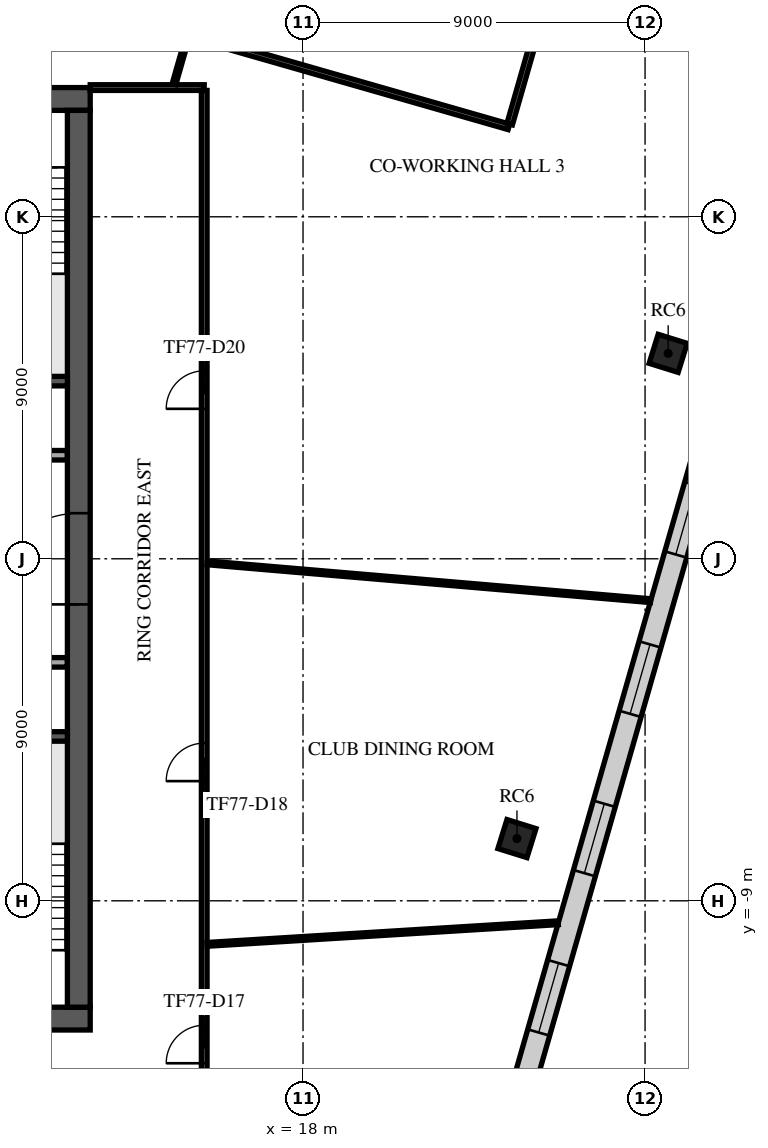
"""IFC4 building model, lengths in metres.
Left out: names, types, materials, properties, quantities, classifications, styles, units other than length and angle.
Written with IfcOpenShell. Run it as: python <this file> out.ifc"""

import sys

from ifc_helpers import new_model, si_unit, direction, frame, frame_2d, origin, origin_2d, place, context, subcontext, project, spatial, rectangle, extrude, element, fill, save


model = new_model("IFC4")
c1 = context("Model", 3, precision=1e-05, world=origin(), true_north=direction((0.0, 1.0)))
c2 = subcontext(c1, "Body", "Model", "MODEL_VIEW")
j1 = project(units=[si_unit("LENGTHUNIT", "METRE"), si_unit("PLANEANGLEUNIT", "RADIAN")], contexts=[c1])
p1 = place(None, origin())
s1 = spatial("IfcSite", under=j1, at=p1, CompositionType="ELEMENT")
p2 = place(p1, origin())
s2 = spatial("IfcBuilding", under=s1, at=p2, CompositionType="ELEMENT")
p3 = place(p2, frame((0.0, 0.0, 324.5)))
s3 = spatial("IfcBuildingStorey", under=s2, at=p3, CompositionType="ELEMENT", Elevation=324.5)
for number, where, z_axis, x_axis in (
    (1, (23.629, -7.363, 0.0), (0.0, 0.0, 1.0), (0.298, 0.955, 0.0)),
    (2, (27.608, 5.406, 0.0), (0.0, 0.0, 1.0), (0.298, 0.955, 0.0)),
):
    element("IfcColumn", number, at=place(p3, frame(where, z_axis=z_axis, x_axis=x_axis)), inside=s3, PredefinedType="COLUMN", context=c2, shape_type="SweptSolid", body=[
        extrude(rectangle(XDim=0.8, YDim=0.8, at=origin_2d()), origin(), (0.0, 0.0, 1.0), 4.0),
    ])
p4 = place(p3, frame((-12.4, 12.1, 0.0), z_axis=(0.0, 0.0, 1.0), x_axis=(1.0, 0.0, 0.0)))
e3 = element("IfcWall", 3, at=p4, inside=s3, PredefinedType="SHEAR", context=c2, shape_type="SweptSolid", body=[
    extrude(rectangle(XDim=24.8, YDim=0.6, at=frame_2d((12.4, 0.0))), origin(), (0.0, 0.0, 1.0), 3.65),
])
p5 = place(p4, frame((11.2, 0.0, 0.0)))
e4 = element("IfcOpeningElement", 4, at=p5, cuts=e3, PredefinedType="OPENING", context=c2, shape_type="SweptSolid", body=[
    extrude(rectangle(XDim=2.4, YDim=2.4, at=frame_2d((1.2, 1.2))), frame((0.0, 0.31, 0.0), z_axis=(0.0, -1.0, 0.0), x_axis=(1.0, 0.0, 0.0)), (0.0, 0.0, 1.0), 0.62),
])
p6 = place(p4, frame((22.025, 0.0, 0.0)))
e5 = element("IfcOpeningElement", 5, at=p6, cuts=e3, PredefinedType="OPENING", context=c2, shape_type="SweptSolid", body=[
    extrude(rectangle(XDim=1.2, YDim=2.1, at=frame_2d((0.6, 1.05))), frame((0.0, 0.31, 0.0), z_axis=(0.0, -1.0, 0.0), x_axis=(1.0, 0.0, 0.0)), (0.0, 0.0, 1.0), 0.62),
])
p7 = place(p4, frame((1.0, 0.0, 0.0)))
e6 = element("IfcOpeningElement", 6, at=p7, cuts=e3, PredefinedType="OPENING", context=c2, shape_type="SweptSolid", body=[
    extrude(rectangle(XDim=1.0, YDim=2.1, at=frame_2d((0.5, 1.05))), frame((0.0, 0.31, 0.0), z_axis=(0.0, -1.0, 0.0), x_axis=(1.0, 0.0, 0.0)), (0.0, 0.0, 1.0), 0.62),
])
p8 = place(p3, frame((-12.4, -12.1, 0.0), z_axis=(0.0, 0.0, 1.0), x_axis=(1.0, 0.0, 0.0)))
e7 = element("IfcWall", 7, at=p8, inside=s3, PredefinedType="SHEAR", context=c2, shape_type="SweptSolid", body=[
    extrude(rectangle(XDim=24.8, YDim=0.6, at=frame_2d((12.4, 0.0))), origin(), (0.0, 0.0, 1.0), 3.65),
])
p9 = place(p8, frame((7.3, 0.0, 0.0)))
e8 = element("IfcOpeningElement", 8, at=p9, cuts=e7, PredefinedType="OPENING", context=c2, shape_type="SweptSolid", body=[
    extrude(rectangle(XDim=2.0, YDim=2.1, at=frame_2d((1.0, 1.05))), frame((0.0, 0.31, 0.0), z_axis=(0.0, -1.0, 0.0), x_axis=(1.0, 0.0, 0.0)), (0.0, 0.0, 1.0), 0.62),
])
p10 = place(p8, frame((17.425, 0.0, 0.0)))
e9 = element("IfcOpeningElement", 9, at=p10, cuts=e7, PredefinedType="OPENING", context=c2, shape_type="SweptSolid", body=[
    extrude(rectangle(XDim=1.2, YDim=2.1, at=frame_2d((0.6, 1.05))), frame((0.0, 0.31, 0.0), z_axis=(0.0, -1.0, 0.0), x_axis=(1.0, 0.0, 0.0)), (0.0, 0.0, 1.0), 0.62),
])
p11 = place(p8, frame((1.575, 0.0, 0.0)))
e10 = element("IfcOpeningElement", 10, at=p11, cuts=e7, PredefinedType="OPENING", context=c2, shape_type="SweptSolid", body=[
    extrude(rectangle(XDim=1.2, YDim=2.1, at=frame_2d((0.6, 1.05))), frame((0.0, 0.31, 0.0), z_axis=(0.0, -1.0, 0.0), x_axis=(1.0, 0.0, 0.0)), (0.0, 0.0, 1.0), 0.62),
])
p12 = place(p8, frame((22.025, 0.0, 0.0)))
e11 = element("IfcOpeningElement", 11, at=p12, cuts=e7, PredefinedType="OPENING", context=c2, shape_type="SweptSolid", body=[
    extrude(rectangle(XDim=1.2, YDim=2.1, at=frame_2d((0.6, 1.05))), frame((0.0, 0.31, 0.0), z_axis=(0.0, -1.0, 0.0), x_axis=(1.0, 0.0, 0.0)), (0.0, 0.0, 1.0), 0.62),
])
p13 = place(p3, frame((12.1, -11.8, 0.0), z_axis=(0.0, 0.0, 1.0), x_axis=(0.0, 1.0, 0.0)))
e12 = element("IfcWall", 12, at=p13, inside=s3, PredefinedType="SHEAR", context=c2, shape_type="SweptSolid", body=[
    extrude(rectangle(XDim=23.6, YDim=0.6, at=frame_2d((11.8, 0.0))), origin(), (0.0, 0.0, 1.0), 3.65),
])
p14 = place(p13, frame((10.6, 0.0, 0.0)))
e13 = element("IfcOpeningElement", 13, at=p14, cuts=e12, PredefinedType="OPENING", context=c2, shape_type="SweptSolid", body=[
    extrude(rectangle(XDim=2.4, YDim=2.4, at=frame_2d((1.2, 1.2))), frame((0.0, 0.31, 0.0), z_axis=(0.0, -1.0, 0.0), x_axis=(1.0, 0.0, 0.0)), (0.0, 0.0, 1.0), 0.62),
])
for number, where, z_axis, x_axis in (
    (14, (8.65, 4.675, 0.0), (0.0, 0.0, 1.0), (1.0, 0.0, 0.0)),
    (15, (8.65, -4.675, 0.0), (0.0, 0.0, 1.0), (1.0, 0.0, 0.0)),
):
    element("IfcWall", number, at=place(p3, frame(where, z_axis=z_axis, x_axis=x_axis)), inside=s3, PredefinedType="SOLIDWALL", context=c2, shape_type="SweptSolid", body=[
        extrude(rectangle(XDim=3.15, YDim=0.25, at=frame_2d((1.575, 0.0))), origin(), (0.0, 0.0, 1.0), 3.65),
    ])
p15 = place(p3, frame((5.63, -2.725, 0.0), z_axis=(0.0, 0.0, 1.0), x_axis=(1.0, 0.0, 0.0)))
e16 = element("IfcWall", 16, at=p15, inside=s3, PredefinedType="PARTITIONING", context=c2, shape_type="SweptSolid", body=[
    extrude(rectangle(XDim=6.165, YDim=0.25, at=frame_2d((3.083, 0.0))), origin(), (0.0, 0.0, 1.0), 3.65),
])
p16 = place(p15, frame((0.745, 0.0, 0.0)))
e17 = element("IfcOpeningElement", 17, at=p16, cuts=e16, PredefinedType="OPENING", context=c2, shape_type="SweptSolid", body=[
    extrude(rectangle(XDim=1.0, YDim=2.1, at=frame_2d((0.5, 1.05))), frame((0.0, 0.135, 0.0), z_axis=(0.0, -1.0, 0.0), x_axis=(1.0, 0.0, 0.0)), (0.0, 0.0, 1.0), 0.27),
])
p17 = place(p15, frame((3.92, 0.0, 0.0)))
e18 = element("IfcOpeningElement", 18, at=p17, cuts=e16, PredefinedType="OPENING", context=c2, shape_type="SweptSolid", body=[
    extrude(rectangle(XDim=0.9, YDim=2.1, at=frame_2d((0.45, 1.05))), frame((0.0, 0.135, 0.0), z_axis=(0.0, -1.0, 0.0), x_axis=(1.0, 0.0, 0.0)), (0.0, 0.0, 1.0), 0.27),
])
p18 = place(p3, frame((-11.795, 2.725, 0.0), z_axis=(0.0, 0.0, 1.0), x_axis=(1.0, 0.0, 0.0)))
e19 = element("IfcWall", 19, at=p18, inside=s3, PredefinedType="PARTITIONING", context=c2, shape_type="SweptSolid", body=[
    extrude(rectangle(XDim=23.59, YDim=0.25, at=frame_2d((11.795, 0.0))), origin(), (0.0, 0.0, 1.0), 3.65),
])
p19 = place(p18, frame((21.345, 0.0, 0.0)))
e20 = element("IfcOpeningElement", 20, at=p19, cuts=e19, PredefinedType="OPENING", context=c2, shape_type="SweptSolid", body=[
    extrude(rectangle(XDim=0.9, YDim=2.1, at=frame_2d((0.45, 1.05))), frame((0.0, 0.135, 0.0), z_axis=(0.0, -1.0, 0.0), x_axis=(1.0, 0.0, 0.0)), (0.0, 0.0, 1.0), 0.27),
])
p20 = place(p18, frame((1.345, 0.0, 0.0)))
e21 = element("IfcOpeningElement", 21, at=p20, cuts=e19, PredefinedType="OPENING", context=c2, shape_type="SweptSolid", body=[
    extrude(rectangle(XDim=0.9, YDim=2.1, at=frame_2d((0.45, 1.05))), frame((0.0, 0.135, 0.0), z_axis=(0.0, -1.0, 0.0), x_axis=(1.0, 0.0, 0.0)), (0.0, 0.0, 1.0), 0.27),
])
p21 = place(p18, frame((4.32, 0.0, 0.0)))
e22 = element("IfcOpeningElement", 22, at=p21, cuts=e19, PredefinedType="OPENING", context=c2, shape_type="SweptSolid", body=[
    extrude(rectangle(XDim=1.2, YDim=2.1, at=frame_2d((0.6, 1.05))), frame((0.0, 0.135, 0.0), z_axis=(0.0, -1.0, 0.0), x_axis=(1.0, 0.0, 0.0)), (0.0, 0.0, 1.0), 0.27),
])
p22 = place(p18, frame((12.57, 0.0, 0.0)))
e23 = element("IfcOpeningElement", 23, at=p22, cuts=e19, PredefinedType="OPENING", context=c2, shape_type="SweptSolid", body=[
    extrude(rectangle(XDim=1.2, YDim=2.1, at=frame_2d((0.6, 1.05))), frame((0.0, 0.135, 0.0), z_axis=(0.0, -1.0, 0.0), x_axis=(1.0, 0.0, 0.0)), (0.0, 0.0, 1.0), 0.27),
])
p23 = place(p3, frame((19.053, -30.42, 0.0), z_axis=(0.0, 0.0, 1.0), x_axis=(0.275637022814, 0.961261791425, 0.0)))
e24 = element("IfcWall", 24, at=p23, inside=s3, PredefinedType="STANDARD", context=c2, shape_type="SweptSolid", body=[
    extrude(rectangle(XDim=47.979, YDim=0.6, at=frame_2d((23.99, 0.0))), origin(), (0.0, 0.0, 1.0), 3.65),
])
p24 = place(p23, frame((1.231, 0.0, 0.9)))
e25 = element("IfcOpeningElement", 25, at=p24, cuts=e24, PredefinedType="OPENING", context=c2, shape_type="SweptSolid", body=[
    extrude(rectangle(XDim=1.9, YDim=2.1, at=frame_2d((0.95, 1.05))), frame((0.0, 0.31, 0.0), z_axis=(0.0, -1.0, 0.0), x_axis=(1.0, 0.0, 0.0)), (0.0, 0.0, 1.0), 0.62),
])
p25 = place(p23, frame((5.593, 0.0, 0.9)))
e26 = element("IfcOpeningElement", 26, at=p25, cuts=e24, PredefinedType="OPENING", context=c2, shape_type="SweptSolid", body=[
    extrude(rectangle(XDim=1.9, YDim=2.1, at=frame_2d((0.95, 1.05))), frame((0.0, 0.31, 0.0), z_axis=(0.0, -1.0, 0.0), x_axis=(1.0, 0.0, 0.0)), (0.0, 0.0, 1.0), 0.62),
])
p26 = place(p23, frame((9.954, 0.0, 0.9)))
e27 = element("IfcOpeningElement", 27, at=p26, cuts=e24, PredefinedType="OPENING", context=c2, shape_type="SweptSolid", body=[
    extrude(rectangle(XDim=1.9, YDim=2.1, at=frame_2d((0.95, 1.05))), frame((0.0, 0.31, 0.0), z_axis=(0.0, -1.0, 0.0), x_axis=(1.0, 0.0, 0.0)), (0.0, 0.0, 1.0), 0.62),
])
p27 = place(p23, frame((14.316, 0.0, 0.9)))
e28 = element("IfcOpeningElement", 28, at=p27, cuts=e24, PredefinedType="OPENING", context=c2, shape_type="SweptSolid", body=[
    extrude(rectangle(XDim=1.9, YDim=2.1, at=frame_2d((0.95, 1.05))), frame((0.0, 0.31, 0.0), z_axis=(0.0, -1.0, 0.0), x_axis=(1.0, 0.0, 0.0)), (0.0, 0.0, 1.0), 0.62),
])
p28 = place(p23, frame((18.678, 0.0, 0.9)))
e29 = element("IfcOpeningElement", 29, at=p28, cuts=e24, PredefinedType="OPENING", context=c2, shape_type="SweptSolid", body=[
    extrude(rectangle(XDim=1.9, YDim=2.1, at=frame_2d((0.95, 1.05))), frame((0.0, 0.31, 0.0), z_axis=(0.0, -1.0, 0.0), x_axis=(1.0, 0.0, 0.0)), (0.0, 0.0, 1.0), 0.62),
])
p29 = place(p23, frame((23.04, 0.0, 0.9)))
e30 = element("IfcOpeningElement", 30, at=p29, cuts=e24, PredefinedType="OPENING", context=c2, shape_type="SweptSolid", body=[
    extrude(rectangle(XDim=1.9, YDim=2.1, at=frame_2d((0.95, 1.05))), frame((0.0, 0.31, 0.0), z_axis=(0.0, -1.0, 0.0), x_axis=(1.0, 0.0, 0.0)), (0.0, 0.0, 1.0), 0.62),
])
p30 = place(p23, frame((27.401, 0.0, 0.9)))
e31 = element("IfcOpeningElement", 31, at=p30, cuts=e24, PredefinedType="OPENING", context=c2, shape_type="SweptSolid", body=[
    extrude(rectangle(XDim=1.9, YDim=2.1, at=frame_2d((0.95, 1.05))), frame((0.0, 0.31, 0.0), z_axis=(0.0, -1.0, 0.0), x_axis=(1.0, 0.0, 0.0)), (0.0, 0.0, 1.0), 0.62),
])
p31 = place(p23, frame((31.763, 0.0, 0.9)))
e32 = element("IfcOpeningElement", 32, at=p31, cuts=e24, PredefinedType="OPENING", context=c2, shape_type="SweptSolid", body=[
    extrude(rectangle(XDim=1.9, YDim=2.1, at=frame_2d((0.95, 1.05))), frame((0.0, 0.31, 0.0), z_axis=(0.0, -1.0, 0.0), x_axis=(1.0, 0.0, 0.0)), (0.0, 0.0, 1.0), 0.62),
])
p32 = place(p23, frame((36.125, 0.0, 0.9)))
e33 = element("IfcOpeningElement", 33, at=p32, cuts=e24, PredefinedType="OPENING", context=c2, shape_type="SweptSolid", body=[
    extrude(rectangle(XDim=1.9, YDim=2.1, at=frame_2d((0.95, 1.05))), frame((0.0, 0.31, 0.0), z_axis=(0.0, -1.0, 0.0), x_axis=(1.0, 0.0, 0.0)), (0.0, 0.0, 1.0), 0.62),
])
p33 = place(p23, frame((40.487, 0.0, 0.9)))
e34 = element("IfcOpeningElement", 34, at=p33, cuts=e24, PredefinedType="OPENING", context=c2, shape_type="SweptSolid", body=[
    extrude(rectangle(XDim=1.9, YDim=2.1, at=frame_2d((0.95, 1.05))), frame((0.0, 0.31, 0.0), z_axis=(0.0, -1.0, 0.0), x_axis=(1.0, 0.0, 0.0)), (0.0, 0.0, 1.0), 0.62),
])
p34 = place(p23, frame((44.848, 0.0, 0.9)))
e35 = element("IfcOpeningElement", 35, at=p34, cuts=e24, PredefinedType="OPENING", context=c2, shape_type="SweptSolid", body=[
    extrude(rectangle(XDim=1.9, YDim=2.1, at=frame_2d((0.95, 1.05))), frame((0.0, 0.31, 0.0), z_axis=(0.0, -1.0, 0.0), x_axis=(1.0, 0.0, 0.0)), (0.0, 0.0, 1.0), 0.62),
])
p35 = place(p3, frame((28.556, 13.395, 0.0), z_axis=(0.0, 0.0, 1.0), x_axis=(-0.48481597855, 0.874616182644, 0.0)))
e36 = element("IfcWall", 36, at=p35, inside=s3, PredefinedType="STANDARD", context=c2, shape_type="SweptSolid", body=[
    extrude(rectangle(XDim=8.5, YDim=0.6, at=frame_2d((4.25, 0.0))), origin(), (0.0, 0.0, 1.0), 3.65),
])
p36 = place(p35, frame((5.475, 0.0, 0.9)))
e37 = element("IfcOpeningElement", 37, at=p36, cuts=e36, PredefinedType="OPENING", context=c2, shape_type="SweptSolid", body=[
    extrude(rectangle(XDim=1.8, YDim=2.1, at=frame_2d((0.9, 1.05))), frame((0.0, 0.31, 0.0), z_axis=(0.0, -1.0, 0.0), x_axis=(1.0, 0.0, 0.0)), (0.0, 0.0, 1.0), 0.62),
])
p37 = place(p3, frame((9.179, 15.448, 0.0), z_axis=(0.0, 0.0, 1.0), x_axis=(0.961267886057, -0.275615767392, 0.0)))
e38 = element("IfcWall", 38, at=p37, inside=s3, PredefinedType="PARTITIONING", context=c2, shape_type="SweptSolid", body=[
    extrude(rectangle(XDim=14.812, YDim=0.15, at=frame_2d((7.406, 0.0))), origin(), (0.0, 0.0, 1.0), 3.25),
])
p38 = place(p37, frame((1.05, 0.0, 0.0)))
e39 = element("IfcOpeningElement", 39, at=p38, cuts=e38, PredefinedType="OPENING", context=c2, shape_type="SweptSolid", body=[
    extrude(rectangle(XDim=1.0, YDim=2.1, at=frame_2d((0.5, 1.05))), frame((0.0, 0.085, 0.0), z_axis=(0.0, -1.0, 0.0), x_axis=(1.0, 0.0, 0.0)), (0.0, 0.0, 1.0), 0.17),
])
p39 = place(p3, frame((12.4, 12.4, 0.0), z_axis=(0.0, 0.0, 1.0), x_axis=(1.0, 0.0, 0.0)))
e40 = element("IfcWall", 40, at=p39, inside=s3, PredefinedType="PARTITIONING", context=c2, shape_type="SweptSolid", body=[
    extrude(rectangle(XDim=3.0, YDim=0.15, at=frame_2d((1.5, 0.0))), origin(), (0.0, 0.0, 1.0), 3.13),
])
p40 = place(p3, frame((15.4, -15.325, 0.0), z_axis=(0.0, 0.0, 1.0), x_axis=(0.0, 1.0, 0.0)))
e41 = element("IfcWall", 41, at=p40, inside=s3, PredefinedType="PARTITIONING", context=c2, shape_type="SweptSolid", body=[
    extrude(rectangle(XDim=27.65, YDim=0.15, at=frame_2d((13.825, 0.0))), origin(), (0.0, 0.0, 1.0), 3.25),
])
p41 = place(p40, frame((2.05, 0.0, 0.0)))
e42 = element("IfcOpeningElement", 42, at=p41, cuts=e41, PredefinedType="OPENING", context=c2, shape_type="SweptSolid", body=[
    extrude(rectangle(XDim=1.0, YDim=2.1, at=frame_2d((0.5, 1.05))), frame((0.0, 0.085, 0.0), z_axis=(0.0, -1.0, 0.0), x_axis=(1.0, 0.0, 0.0)), (0.0, 0.0, 1.0), 0.17),
])
p42 = place(p40, frame((9.474, 0.0, 0.0)))
e43 = element("IfcOpeningElement", 43, at=p42, cuts=e41, PredefinedType="OPENING", context=c2, shape_type="SweptSolid", body=[
    extrude(rectangle(XDim=1.0, YDim=2.1, at=frame_2d((0.5, 1.05))), frame((0.0, 0.085, 0.0), z_axis=(0.0, -1.0, 0.0), x_axis=(1.0, 0.0, 0.0)), (0.0, 0.0, 1.0), 0.17),
])
p43 = place(p40, frame((19.271, 0.0, 0.0)))
e44 = element("IfcOpeningElement", 44, at=p43, cuts=e41, PredefinedType="OPENING", context=c2, shape_type="SweptSolid", body=[
    extrude(rectangle(XDim=1.0, YDim=2.1, at=frame_2d((0.5, 1.05))), frame((0.0, 0.085, 0.0), z_axis=(0.0, -1.0, 0.0), x_axis=(1.0, 0.0, 0.0)), (0.0, 0.0, 1.0), 0.17),
])
p44 = place(p3, frame((23.438, 11.438, 0.0), z_axis=(0.0, 0.0, 1.0), x_axis=(0.275810058081, 0.96121215757, 0.0)))
e45 = element("IfcWall", 45, at=p44, inside=s3, PredefinedType="PARTITIONING", context=c2, shape_type="SweptSolid", body=[
    extrude(rectangle(XDim=2.25, YDim=0.15, at=frame_2d((1.125, 0.0))), origin(), (0.0, 0.0, 1.0), 3.65),
])
p45 = place(p3, frame((14.604, 12.489, 0.0), z_axis=(0.0, 0.0, 1.0), x_axis=(0.275303052491, 0.96135749297, 0.0)))
e46 = element("IfcWall", 46, at=p45, inside=s3, PredefinedType="PARTITIONING", context=c2, shape_type="SweptSolid", body=[
    extrude(rectangle(XDim=1.274, YDim=0.1, at=frame_2d((0.637, 0.0))), origin(), (0.0, 0.0, 1.0), 3.25),
])
p46 = place(p3, frame((15.478, -10.146, 0.0), z_axis=(0.0, 0.0, 1.0), x_axis=(0.998109331295, 0.061463507728, 0.0)))
e47 = element("IfcWall", 47, at=p46, inside=s3, PredefinedType="PARTITIONING", context=c2, shape_type="SweptSolid", body=[
    extrude(rectangle(XDim=9.255, YDim=0.1, at=frame_2d((4.627, 0.0))), origin(), (0.0, 0.0, 1.0), 3.05),
])
p47 = place(p3, frame((15.479, -0.107, 0.0), z_axis=(0.0, 0.0, 1.0), x_axis=(0.996382096483, -0.084986574283, 0.0)))
e48 = element("IfcWall", 48, at=p47, inside=s3, PredefinedType="PARTITIONING", context=c2, shape_type="SweptSolid", body=[
    extrude(rectangle(XDim=11.709, YDim=0.1, at=frame_2d((5.854, 0.0))), origin(), (0.0, 0.0, 1.0), 3.05),
])
p48 = place(p14, origin())
e49 = element("IfcDoor", 49, at=p48, inside=s3, OperationType="SINGLE_SWING_LEFT", PredefinedType="DOOR", context=c2, shape_type="SweptSolid", body=[
    extrude(rectangle(XDim=2.4, YDim=2.4, at=frame_2d((1.2, 1.2))), frame((0.0, 0.025, 0.0), z_axis=(0.0, -1.0, 0.0), x_axis=(1.0, 0.0, 0.0)), (0.0, 0.0, 1.0), 0.05),
])
fill(e13, e49)
p49 = place(p28, origin())
e50 = element("IfcWindow", 50, at=p49, inside=s3, PartitioningType="SINGLE_PANEL", PredefinedType="WINDOW", context=c2, shape_type="SweptSolid", body=[
    extrude(rectangle(XDim=1.9, YDim=2.1, at=frame_2d((0.95, 1.05))), frame((0.0, 0.03, 0.0), z_axis=(0.0, -1.0, 0.0), x_axis=(1.0, 0.0, 0.0)), (0.0, 0.0, 1.0), 0.06),
])
fill(e29, e50)
p50 = place(p29, origin())
e51 = element("IfcWindow", 51, at=p50, inside=s3, PartitioningType="SINGLE_PANEL", PredefinedType="WINDOW", context=c2, shape_type="SweptSolid", body=[
    extrude(rectangle(XDim=1.9, YDim=2.1, at=frame_2d((0.95, 1.05))), frame((0.0, 0.03, 0.0), z_axis=(0.0, -1.0, 0.0), x_axis=(1.0, 0.0, 0.0)), (0.0, 0.0, 1.0), 0.06),
])
fill(e30, e51)
p51 = place(p30, origin())
e52 = element("IfcWindow", 52, at=p51, inside=s3, PartitioningType="SINGLE_PANEL", PredefinedType="WINDOW", context=c2, shape_type="SweptSolid", body=[
    extrude(rectangle(XDim=1.9, YDim=2.1, at=frame_2d((0.95, 1.05))), frame((0.0, 0.03, 0.0), z_axis=(0.0, -1.0, 0.0), x_axis=(1.0, 0.0, 0.0)), (0.0, 0.0, 1.0), 0.06),
])
fill(e31, e52)
p52 = place(p31, origin())
e53 = element("IfcWindow", 53, at=p52, inside=s3, PartitioningType="SINGLE_PANEL", PredefinedType="WINDOW", context=c2, shape_type="SweptSolid", body=[
    extrude(rectangle(XDim=1.9, YDim=2.1, at=frame_2d((0.95, 1.05))), frame((0.0, 0.03, 0.0), z_axis=(0.0, -1.0, 0.0), x_axis=(1.0, 0.0, 0.0)), (0.0, 0.0, 1.0), 0.06),
])
fill(e32, e53)
p53 = place(p41, frame((1.0, 0.0, 0.0), z_axis=(0.0, 0.0, 1.0), x_axis=(-1.0, 0.0, 0.0)))
e54 = element("IfcDoor", 54, at=p53, inside=s3, OperationType="SINGLE_SWING_RIGHT", PredefinedType="DOOR", context=c2, shape_type="SweptSolid", body=[
    extrude(rectangle(XDim=1.0, YDim=2.1, at=frame_2d((0.5, 1.05))), frame((0.0, 0.025, 0.0), z_axis=(0.0, -1.0, 0.0), x_axis=(1.0, 0.0, 0.0)), (0.0, 0.0, 1.0), 0.05),
])
fill(e42, e54)
p54 = place(p42, frame((1.0, 0.0, 0.0), z_axis=(0.0, 0.0, 1.0), x_axis=(-1.0, 0.0, 0.0)))
e55 = element("IfcDoor", 55, at=p54, inside=s3, OperationType="SINGLE_SWING_LEFT", PredefinedType="DOOR", context=c2, shape_type="SweptSolid", body=[
    extrude(rectangle(XDim=1.0, YDim=2.1, at=frame_2d((0.5, 1.05))), frame((0.0, 0.025, 0.0), z_axis=(0.0, -1.0, 0.0), x_axis=(1.0, 0.0, 0.0)), (0.0, 0.0, 1.0), 0.05),
])
fill(e43, e55)
p55 = place(p43, frame((1.0, 0.0, 0.0), z_axis=(0.0, 0.0, 1.0), x_axis=(-1.0, 0.0, 0.0)))
e56 = element("IfcDoor", 56, at=p55, inside=s3, OperationType="SINGLE_SWING_LEFT", PredefinedType="DOOR", context=c2, shape_type="SweptSolid", body=[
    extrude(rectangle(XDim=1.0, YDim=2.1, at=frame_2d((0.5, 1.05))), frame((0.0, 0.025, 0.0), z_axis=(0.0, -1.0, 0.0), x_axis=(1.0, 0.0, 0.0)), (0.0, 0.0, 1.0), 0.05),
])
fill(e44, e56)
save(model, sys.argv[1])
